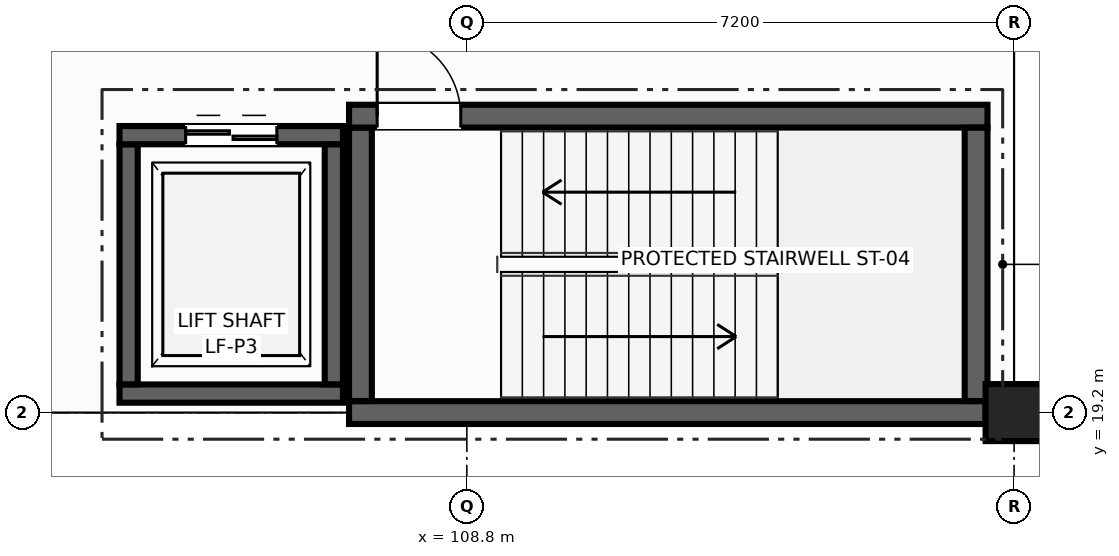
"""IFC4 building model, lengths in metres.
Left out: names, types, materials, properties, quantities, classifications, styles, units other than length and angle.
Written with IfcOpenShell. Run it as: python <this file> out.ifc"""

import sys

from ifc_helpers import new_model, si_unit, direction, frame, frame_2d, origin, origin_2d, place, context, subcontext, project, spatial, rectangle, extrude, element, fill, save


model = new_model("IFC4")
c1 = context("Model", 3, precision=1e-05, world=origin(), true_north=direction((0.0, 1.0)))
c2 = subcontext(c1, "Body", "Model", "MODEL_VIEW")
j1 = project(units=[si_unit("LENGTHUNIT", "METRE"), si_unit("PLANEANGLEUNIT", "RADIAN")], contexts=[c1])
p1 = place(None, origin())
s1 = spatial("IfcSite", under=j1, at=p1, CompositionType="ELEMENT")
p2 = place(p1, origin())
s2 = spatial("IfcBuilding", under=s1, at=p2, CompositionType="ELEMENT")
p3 = place(p2, frame((0.0, 0.0, -4.8)))
s3 = spatial("IfcBuildingStorey", under=s2, at=p3, CompositionType="ELEMENT", Elevation=-4.8)
p4 = place(p3, frame((116.0, 19.2, 0.0), z_axis=(0.0, 0.0, 1.0), x_axis=(0.0, 1.0, 0.0)))
e1 = element("IfcColumn", 1, at=p4, inside=s3, PredefinedType="COLUMN", context=c2, shape_type="SweptSolid", body=[
    extrude(rectangle(XDim=0.75, YDim=0.75, at=origin_2d()), origin(), (0.0, 0.0, 1.0), 4.8),
])
p5 = place(p3, frame((115.625, 19.2, 0.0), z_axis=(0.0, 0.0, 1.0), x_axis=(-1.0, 0.0, 0.0)))
e2 = element("IfcWall", 2, at=p5, inside=s3, PredefinedType="SHEAR", context=c2, shape_type="SweptSolid", body=[
    extrude(rectangle(XDim=8.375, YDim=0.3, at=frame_2d((4.188, 0.0))), origin(), (0.0, 0.0, 1.0), 4.48),
])
p6 = place(p3, frame((107.4, 19.352, 0.0), z_axis=(0.0, 0.0, 1.0), x_axis=(0.0, 1.0, 0.0)))
e3 = element("IfcWall", 3, at=p6, inside=s3, PredefinedType="SHEAR", context=c2, shape_type="SweptSolid", body=[
    extrude(rectangle(XDim=3.598, YDim=0.3, at=frame_2d((1.799, 0.0))), origin(), (0.0, 0.0, 1.0), 4.48),
])
p7 = place(p3, frame((107.25, 23.1, 0.0), z_axis=(0.0, 0.0, 1.0), x_axis=(1.0, 0.0, 0.0)))
e4 = element("IfcWall", 4, at=p7, inside=s3, PredefinedType="SHEAR", context=c2, shape_type="SweptSolid", body=[
    extrude(rectangle(XDim=8.4, YDim=0.3, at=frame_2d((4.2, 0.0))), origin(), (0.0, 0.0, 1.0), 4.48),
])
p8 = place(p7, frame((0.37, 0.0, 0.0)))
e5 = element("IfcOpeningElement", 5, at=p8, cuts=e4, PredefinedType="OPENING", context=c2, shape_type="SweptSolid", body=[
    extrude(rectangle(XDim=1.1, YDim=2.15, at=frame_2d((0.55, 1.075))), frame((0.0, 0.16, 0.0), z_axis=(0.0, -1.0, 0.0), x_axis=(1.0, 0.0, 0.0)), (0.0, 0.0, 1.0), 0.32),
])
p9 = place(p3, frame((115.5, 22.948, 0.0), z_axis=(0.0, 0.0, 1.0), x_axis=(0.0, -1.0, 0.0)))
e6 = element("IfcWall", 6, at=p9, inside=s3, PredefinedType="SHEAR", context=c2, shape_type="SweptSolid", body=[
    extrude(rectangle(XDim=3.596, YDim=0.3, at=frame_2d((1.798, 0.0))), origin(), (0.0, 0.0, 1.0), 4.48),
])
p10 = place(p3, frame((107.17, 19.45, 0.0), z_axis=(0.0, 0.0, 1.0), x_axis=(-1.0, 0.0, 0.0)))
e7 = element("IfcWall", 7, at=p10, inside=s3, PredefinedType="SHEAR", context=c2, shape_type="SweptSolid", body=[
    extrude(rectangle(XDim=2.94, YDim=0.24, at=frame_2d((1.47, 0.0))), origin(), (0.0, 0.0, 1.0), 4.48),
])
p11 = place(p3, frame((104.35, 19.572, 0.0), z_axis=(0.0, 0.0, 1.0), x_axis=(0.0, 1.0, 0.0)))
e8 = element("IfcWall", 8, at=p11, inside=s3, PredefinedType="SHEAR", context=c2, shape_type="SweptSolid", body=[
    extrude(rectangle(XDim=3.158, YDim=0.24, at=frame_2d((1.579, 0.0))), origin(), (0.0, 0.0, 1.0), 4.48),
])
p12 = place(p3, frame((104.23, 22.85, 0.0), z_axis=(0.0, 0.0, 1.0), x_axis=(1.0, 0.0, 0.0)))
e9 = element("IfcWall", 9, at=p12, inside=s3, PredefinedType="SHEAR", context=c2, shape_type="SweptSolid", body=[
    extrude(rectangle(XDim=2.94, YDim=0.24, at=frame_2d((1.47, 0.0))), origin(), (0.0, 0.0, 1.0), 4.48),
])
p13 = place(p12, frame((0.87, 0.0, 0.0)))
e10 = element("IfcOpeningElement", 10, at=p13, cuts=e9, PredefinedType="OPENING", context=c2, shape_type="SweptSolid", body=[
    extrude(rectangle(XDim=1.2, YDim=2.15, at=frame_2d((0.6, 1.075))), frame((0.0, 0.13, 0.0), z_axis=(0.0, -1.0, 0.0), x_axis=(1.0, 0.0, 0.0)), (0.0, 0.0, 1.0), 0.26),
])
p14 = place(p3, frame((107.05, 22.728, 0.0), z_axis=(0.0, 0.0, 1.0), x_axis=(0.0, -1.0, 0.0)))
e11 = element("IfcWall", 11, at=p14, inside=s3, PredefinedType="SHEAR", context=c2, shape_type="SweptSolid", body=[
    extrude(rectangle(XDim=3.156, YDim=0.24, at=frame_2d((1.578, 0.0))), origin(), (0.0, 0.0, 1.0), 4.48),
])
p15 = place(p8, origin())
e12 = element("IfcDoor", 12, at=p15, inside=s3, OperationType="SINGLE_SWING_LEFT", PredefinedType="DOOR", context=c2, shape_type="SweptSolid", body=[
    extrude(rectangle(XDim=1.1, YDim=2.15, at=frame_2d((0.55, 1.075))), frame((0.0, 0.025, 0.0), z_axis=(0.0, -1.0, 0.0), x_axis=(1.0, 0.0, 0.0)), (0.0, 0.0, 1.0), 0.05),
])
fill(e5, e12)
p16 = place(p13, origin())
e13 = element("IfcDoor", 13, at=p16, inside=s3, OperationType="DOUBLE_DOOR_SLIDING", PredefinedType="DOOR", context=c2, shape_type="SweptSolid", body=[
    extrude(rectangle(XDim=1.2, YDim=2.15, at=frame_2d((0.6, 1.075))), frame((0.0, 0.025, 0.0), z_axis=(0.0, -1.0, 0.0), x_axis=(1.0, 0.0, 0.0)), (0.0, 0.0, 1.0), 0.05),
])
fill(e10, e13)
save(model, sys.argv[1])
